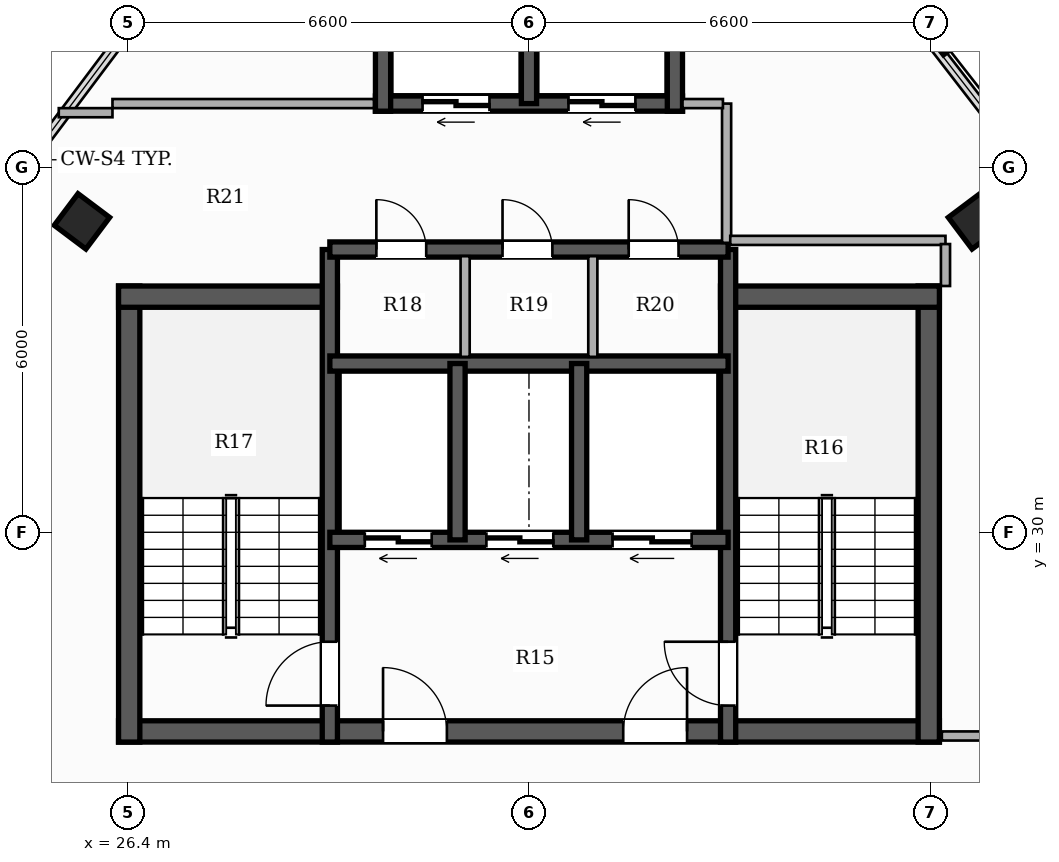
"""IFC4 building model, lengths in metres.
Left out: names, types, materials, properties, quantities, classifications, styles, units other than length and angle.
Written with IfcOpenShell. Run it as: python <this file> out.ifc"""

import sys

from ifc_helpers import new_model, si_unit, direction, frame, frame_2d, origin, origin_2d, place, context, subcontext, project, spatial, rectangle, hollow_rectangle, extrude, element, fill, save


model = new_model("IFC4")
c1 = context("Model", 3, precision=1e-05, world=origin(), true_north=direction((0.0, 1.0)))
c2 = subcontext(c1, "Body", "Model", "MODEL_VIEW")
j1 = project(units=[si_unit("LENGTHUNIT", "METRE"), si_unit("PLANEANGLEUNIT", "RADIAN")], contexts=[c1])
p1 = place(None, origin())
s1 = spatial("IfcSite", under=j1, at=p1, CompositionType="ELEMENT")
p2 = place(p1, origin())
s2 = spatial("IfcBuilding", under=s1, at=p2, CompositionType="ELEMENT")
p3 = place(p2, frame((0.0, 0.0, 266.75)))
s3 = spatial("IfcBuildingStorey", under=s2, at=p3, CompositionType="ELEMENT", Elevation=266.75)
p4 = place(p3, frame((26.25, 26.725, 0.0), z_axis=(0.0, 0.0, 1.0), x_axis=(1.0, 0.0, 0.0)))
e1 = element("IfcWall", 1, at=p4, inside=s3, PredefinedType="SHEAR", context=c2, shape_type="SweptSolid", body=[
    extrude(rectangle(XDim=13.5, YDim=0.35, at=frame_2d((6.75, 0.0))), origin(), (0.0, 0.0, 1.0), 3.3),
])
p5 = place(p4, frame((4.35, 0.0, 0.0)))
e2 = element("IfcOpeningElement", 2, at=p5, cuts=e1, PredefinedType="OPENING", context=c2, shape_type="SweptSolid", body=[
    extrude(rectangle(XDim=1.05, YDim=2.15, at=frame_2d((0.525, 1.075))), frame((0.0, 0.185, 0.0), z_axis=(0.0, -1.0, 0.0), x_axis=(1.0, 0.0, 0.0)), (0.0, 0.0, 1.0), 0.37),
])
p6 = place(p4, frame((8.3, 0.0, 0.0)))
e3 = element("IfcOpeningElement", 3, at=p6, cuts=e1, PredefinedType="OPENING", context=c2, shape_type="SweptSolid", body=[
    extrude(rectangle(XDim=1.05, YDim=2.15, at=frame_2d((0.525, 1.075))), frame((0.0, 0.185, 0.0), z_axis=(0.0, -1.0, 0.0), x_axis=(1.0, 0.0, 0.0)), (0.0, 0.0, 1.0), 0.37),
])
p7 = place(p3, frame((26.425, 26.55, 0.0), z_axis=(0.0, 0.0, 1.0), x_axis=(0.0, 1.0, 0.0)))
e4 = element("IfcWall", 4, at=p7, inside=s3, PredefinedType="SHEAR", context=c2, shape_type="SweptSolid", body=[
    extrude(rectangle(XDim=7.5, YDim=0.35, at=frame_2d((3.75, 0.0))), origin(), (0.0, 0.0, 1.0), 3.3),
])
p8 = place(p3, frame((26.25, 33.875, 0.0), z_axis=(0.0, 0.0, 1.0), x_axis=(1.0, 0.0, 0.0)))
e5 = element("IfcWall", 5, at=p8, inside=s3, PredefinedType="SHEAR", context=c2, shape_type="SweptSolid", body=[
    extrude(rectangle(XDim=3.6, YDim=0.35, at=frame_2d((1.8, 0.0))), origin(), (0.0, 0.0, 1.0), 3.3),
])
p9 = place(p3, frame((39.575, 26.55, 0.0), z_axis=(0.0, 0.0, 1.0), x_axis=(0.0, 1.0, 0.0)))
e6 = element("IfcWall", 6, at=p9, inside=s3, PredefinedType="SHEAR", context=c2, shape_type="SweptSolid", body=[
    extrude(rectangle(XDim=7.5, YDim=0.35, at=frame_2d((3.75, 0.0))), origin(), (0.0, 0.0, 1.0), 3.3),
])
p10 = place(p3, frame((36.15, 33.875, 0.0), z_axis=(0.0, 0.0, 1.0), x_axis=(1.0, 0.0, 0.0)))
e7 = element("IfcWall", 7, at=p10, inside=s3, PredefinedType="SHEAR", context=c2, shape_type="SweptSolid", body=[
    extrude(rectangle(XDim=3.6, YDim=0.35, at=frame_2d((1.8, 0.0))), origin(), (0.0, 0.0, 1.0), 3.3),
])
p11 = place(p3, frame((29.725, 26.55, 0.0), z_axis=(0.0, 0.0, 1.0), x_axis=(0.0, 1.0, 0.0)))
e8 = element("IfcWall", 8, at=p11, inside=s3, PredefinedType="SHEAR", context=c2, shape_type="SweptSolid", body=[
    extrude(rectangle(XDim=8.1, YDim=0.25, at=frame_2d((4.05, 0.0))), origin(), (0.0, 0.0, 1.0), 3.3),
])
p12 = place(p11, frame((0.6, 0.0, 0.0)))
e9 = element("IfcOpeningElement", 9, at=p12, cuts=e8, PredefinedType="OPENING", context=c2, shape_type="SweptSolid", body=[
    extrude(rectangle(XDim=1.05, YDim=2.15, at=frame_2d((0.525, 1.075))), frame((0.0, 0.135, 0.0), z_axis=(0.0, -1.0, 0.0), x_axis=(1.0, 0.0, 0.0)), (0.0, 0.0, 1.0), 0.27),
])
p13 = place(p3, frame((36.275, 26.55, 0.0), z_axis=(0.0, 0.0, 1.0), x_axis=(0.0, 1.0, 0.0)))
e10 = element("IfcWall", 10, at=p13, inside=s3, PredefinedType="SHEAR", context=c2, shape_type="SweptSolid", body=[
    extrude(rectangle(XDim=8.1, YDim=0.25, at=frame_2d((4.05, 0.0))), origin(), (0.0, 0.0, 1.0), 3.3),
])
p14 = place(p13, frame((0.6, 0.0, 0.0)))
e11 = element("IfcOpeningElement", 11, at=p14, cuts=e10, PredefinedType="OPENING", context=c2, shape_type="SweptSolid", body=[
    extrude(rectangle(XDim=1.05, YDim=2.15, at=frame_2d((0.525, 1.075))), frame((0.0, 0.135, 0.0), z_axis=(0.0, -1.0, 0.0), x_axis=(1.0, 0.0, 0.0)), (0.0, 0.0, 1.0), 0.27),
])
p15 = place(p3, frame((36.275, 29.875, 0.0), z_axis=(0.0, 0.0, 1.0), x_axis=(-1.0, 0.0, 0.0)))
e12 = element("IfcWall", 12, at=p15, inside=s3, PredefinedType="SHEAR", context=c2, shape_type="SweptSolid", body=[
    extrude(rectangle(XDim=6.55, YDim=0.25, at=frame_2d((3.275, 0.0))), origin(), (0.0, 0.0, 1.0), 3.3),
])
p16 = place(p15, frame((4.875, 0.0, 0.0)))
e13 = element("IfcOpeningElement", 13, at=p16, cuts=e12, PredefinedType="OPENING", context=c2, shape_type="SweptSolid", body=[
    extrude(rectangle(XDim=1.1, YDim=2.2, at=frame_2d((0.55, 1.1))), frame((0.0, 0.135, 0.0), z_axis=(0.0, -1.0, 0.0), x_axis=(1.0, 0.0, 0.0)), (0.0, 0.0, 1.0), 0.27),
])
p17 = place(p15, frame((2.875, 0.0, 0.0)))
e14 = element("IfcOpeningElement", 14, at=p17, cuts=e12, PredefinedType="OPENING", context=c2, shape_type="SweptSolid", body=[
    extrude(rectangle(XDim=1.1, YDim=2.2, at=frame_2d((0.55, 1.1))), frame((0.0, 0.135, 0.0), z_axis=(0.0, -1.0, 0.0), x_axis=(1.0, 0.0, 0.0)), (0.0, 0.0, 1.0), 0.27),
])
p18 = place(p15, frame((0.6, 0.0, 0.0)))
e15 = element("IfcOpeningElement", 15, at=p18, cuts=e12, PredefinedType="OPENING", context=c2, shape_type="SweptSolid", body=[
    extrude(rectangle(XDim=1.3, YDim=2.2, at=frame_2d((0.65, 1.1))), frame((0.0, 0.135, 0.0), z_axis=(0.0, -1.0, 0.0), x_axis=(1.0, 0.0, 0.0)), (0.0, 0.0, 1.0), 0.27),
])
p19 = place(p3, frame((29.725, 32.775, 0.0), z_axis=(0.0, 0.0, 1.0), x_axis=(1.0, 0.0, 0.0)))
e16 = element("IfcWall", 16, at=p19, inside=s3, PredefinedType="SHEAR", context=c2, shape_type="SweptSolid", body=[
    extrude(rectangle(XDim=6.55, YDim=0.25, at=frame_2d((3.275, 0.0))), origin(), (0.0, 0.0, 1.0), 3.3),
])
for number, where, z_axis, x_axis in (
    (17, (31.825, 29.875, 0.0), (0.0, 0.0, 1.0), (0.0, 1.0, 0.0)),
    (18, (33.825, 29.875, 0.0), (0.0, 0.0, 1.0), (0.0, 1.0, 0.0)),
):
    element("IfcWall", number, at=place(p3, frame(where, z_axis=z_axis, x_axis=x_axis)), inside=s3, PredefinedType="SHEAR", context=c2, shape_type="SweptSolid", body=[
        extrude(rectangle(XDim=2.9, YDim=0.25, at=frame_2d((1.45, 0.0))), origin(), (0.0, 0.0, 1.0), 3.3),
    ])
p20 = place(p3, frame((29.725, 34.65, 0.0), z_axis=(0.0, 0.0, 1.0), x_axis=(1.0, 0.0, 0.0)))
e19 = element("IfcWall", 19, at=p20, inside=s3, PredefinedType="SHEAR", context=c2, shape_type="SweptSolid", body=[
    extrude(rectangle(XDim=6.55, YDim=0.25, at=frame_2d((3.275, 0.0))), origin(), (0.0, 0.0, 1.0), 3.3),
])
p21 = place(p20, frame((0.765, 0.0, 0.0)))
e20 = element("IfcOpeningElement", 20, at=p21, cuts=e19, PredefinedType="OPENING", context=c2, shape_type="SweptSolid", body=[
    extrude(rectangle(XDim=0.82, YDim=2.1, at=frame_2d((0.41, 1.05))), frame((0.0, 0.135, 0.0), z_axis=(0.0, -1.0, 0.0), x_axis=(1.0, 0.0, 0.0)), (0.0, 0.0, 1.0), 0.27),
])
p22 = place(p20, frame((2.84, 0.0, 0.0)))
e21 = element("IfcOpeningElement", 21, at=p22, cuts=e19, PredefinedType="OPENING", context=c2, shape_type="SweptSolid", body=[
    extrude(rectangle(XDim=0.82, YDim=2.1, at=frame_2d((0.41, 1.05))), frame((0.0, 0.135, 0.0), z_axis=(0.0, -1.0, 0.0), x_axis=(1.0, 0.0, 0.0)), (0.0, 0.0, 1.0), 0.27),
])
p23 = place(p20, frame((4.915, 0.0, 0.0)))
e22 = element("IfcOpeningElement", 22, at=p23, cuts=e19, PredefinedType="OPENING", context=c2, shape_type="SweptSolid", body=[
    extrude(rectangle(XDim=0.82, YDim=2.1, at=frame_2d((0.41, 1.05))), frame((0.0, 0.135, 0.0), z_axis=(0.0, -1.0, 0.0), x_axis=(1.0, 0.0, 0.0)), (0.0, 0.0, 1.0), 0.27),
])
p24 = place(p3, frame((35.525, 37.05, 0.0), z_axis=(0.0, 0.0, 1.0), x_axis=(-1.0, 0.0, 0.0)))
e23 = element("IfcWall", 23, at=p24, inside=s3, PredefinedType="SHEAR", context=c2, shape_type="SweptSolid", body=[
    extrude(rectangle(XDim=5.05, YDim=0.25, at=frame_2d((2.525, 0.0))), origin(), (0.0, 0.0, 1.0), 3.3),
])
p25 = place(p24, frame((3.175, 0.0, 0.0)))
e24 = element("IfcOpeningElement", 24, at=p25, cuts=e23, PredefinedType="OPENING", context=c2, shape_type="SweptSolid", body=[
    extrude(rectangle(XDim=1.1, YDim=2.2, at=frame_2d((0.55, 1.1))), frame((0.0, 0.135, 0.0), z_axis=(0.0, -1.0, 0.0), x_axis=(1.0, 0.0, 0.0)), (0.0, 0.0, 1.0), 0.27),
])
p26 = place(p24, frame((0.775, 0.0, 0.0)))
e25 = element("IfcOpeningElement", 25, at=p26, cuts=e23, PredefinedType="OPENING", context=c2, shape_type="SweptSolid", body=[
    extrude(rectangle(XDim=1.1, YDim=2.2, at=frame_2d((0.55, 1.1))), frame((0.0, 0.135, 0.0), z_axis=(0.0, -1.0, 0.0), x_axis=(1.0, 0.0, 0.0)), (0.0, 0.0, 1.0), 0.27),
])
for number, where, z_axis, x_axis in (
    (26, (30.6, 36.925, 0.0), (0.0, 0.0, 1.0), (0.0, 1.0, 0.0)),
    (27, (35.4, 36.925, 0.0), (0.0, 0.0, 1.0), (0.0, 1.0, 0.0)),
):
    element("IfcWall", number, at=place(p3, frame(where, z_axis=z_axis, x_axis=x_axis)), inside=s3, PredefinedType="SHEAR", context=c2, shape_type="SweptSolid", body=[
        extrude(rectangle(XDim=2.8, YDim=0.25, at=frame_2d((1.4, 0.0))), origin(), (0.0, 0.0, 1.0), 3.3),
    ])
p27 = place(p3, frame((33.0, 37.05, 0.0), z_axis=(0.0, 0.0, 1.0), x_axis=(0.0, 1.0, 0.0)))
e28 = element("IfcWall", 28, at=p27, inside=s3, PredefinedType="SHEAR", context=c2, shape_type="SweptSolid", body=[
    extrude(rectangle(XDim=2.55, YDim=0.25, at=frame_2d((1.275, 0.0))), origin(), (0.0, 0.0, 1.0), 3.3),
])
for number, where, z_axis, x_axis in (
    (29, (25.648, 35.113, 0.0), (0.0, 0.0, 1.0), (0.6, 0.8, 0.0)),
    (30, (40.352, 35.113, 0.0), (0.0, 0.0, 1.0), (-0.6, 0.8, 0.0)),
):
    element("IfcColumn", number, at=place(p3, frame(where, z_axis=z_axis, x_axis=x_axis)), inside=s3, PredefinedType="COLUMN", context=c2, shape_type="SweptSolid", body=[
        extrude(hollow_rectangle(XDim=0.65, YDim=0.65, WallThickness=0.022, at=origin_2d()), origin(), (0.0, 0.0, 1.0), 3.3),
    ])
p28 = place(p3, frame((36.25, 34.76, 0.0), z_axis=(0.0, 0.0, 1.0), x_axis=(0.0, 1.0, 0.0)))
e31 = element("IfcWall", 31, at=p28, inside=s3, PredefinedType="PARTITIONING", context=c2, shape_type="SweptSolid", body=[
    extrude(rectangle(XDim=2.29, YDim=0.15, at=frame_2d((1.145, 0.0))), origin(), (0.0, 0.0, 1.0), 2.425),
])
p29 = place(p3, frame((35.525, 37.05, 0.0), z_axis=(0.0, 0.0, 1.0), x_axis=(1.0, 0.0, 0.0)))
e32 = element("IfcWall", 32, at=p29, inside=s3, PredefinedType="PARTITIONING", context=c2, shape_type="SweptSolid", body=[
    extrude(rectangle(XDim=0.665, YDim=0.15, at=frame_2d((0.333, 0.0))), origin(), (0.0, 0.0, 1.0), 2.425),
])
for number, where, z_axis, x_axis in (
    (33, (31.95, 32.885, 0.0), (0.0, 0.0, 1.0), (0.0, 1.0, 0.0)),
    (34, (34.05, 32.885, 0.0), (0.0, 0.0, 1.0), (0.0, 1.0, 0.0)),
):
    element("IfcWall", number, at=place(p3, frame(where, z_axis=z_axis, x_axis=x_axis)), inside=s3, PredefinedType="PARTITIONING", context=c2, shape_type="SweptSolid", body=[
        extrude(rectangle(XDim=1.655, YDim=0.15, at=frame_2d((0.828, 0.0))), origin(), (0.0, 0.0, 1.0), 3.06),
    ])
p30 = place(p3, frame((25.267, 36.9, 0.0), z_axis=(0.0, 0.0, 1.0), x_axis=(1.0, 0.0, 0.0)))
e35 = element("IfcWall", 35, at=p30, inside=s3, PredefinedType="PARTITIONING", context=c2, shape_type="SweptSolid", body=[
    extrude(rectangle(XDim=0.883, YDim=0.15, at=frame_2d((0.441, 0.0))), origin(), (0.0, 0.0, 1.0), 3.06),
])
p31 = place(p3, frame((39.79, 26.65, 0.0), z_axis=(0.0, 0.0, 1.0), x_axis=(1.0, 0.0, 0.0)))
e36 = element("IfcWall", 36, at=p31, inside=s3, PredefinedType="PARTITIONING", context=c2, shape_type="SweptSolid", body=[
    extrude(rectangle(XDim=2.46, YDim=0.15, at=frame_2d((1.23, 0.0))), origin(), (0.0, 0.0, 1.0), 2.565),
])
p32 = place(p3, frame((26.15, 37.05, 0.0), z_axis=(0.0, 0.0, 1.0), x_axis=(1.0, 0.0, 0.0)))
e37 = element("IfcWall", 37, at=p32, inside=s3, PredefinedType="PARTITIONING", context=c2, shape_type="SweptSolid", body=[
    extrude(rectangle(XDim=4.3, YDim=0.15, at=frame_2d((2.15, 0.0))), origin(), (0.0, 0.0, 1.0), 2.425),
])
p33 = place(p3, frame((36.31, 34.8, 0.0), z_axis=(0.0, 0.0, 1.0), x_axis=(1.0, 0.0, 0.0)))
e38 = element("IfcWall", 38, at=p33, inside=s3, PredefinedType="PARTITIONING", context=c2, shape_type="SweptSolid", body=[
    extrude(rectangle(XDim=3.54, YDim=0.15, at=frame_2d((1.77, 0.0))), origin(), (0.0, 0.0, 1.0), 2.425),
])
p34 = place(p3, frame((39.85, 34.74, 0.0), z_axis=(0.0, 0.0, 1.0), x_axis=(0.0, -1.0, 0.0)))
e39 = element("IfcWall", 39, at=p34, inside=s3, PredefinedType="PARTITIONING", context=c2, shape_type="SweptSolid", body=[
    extrude(rectangle(XDim=0.69, YDim=0.15, at=frame_2d((0.345, 0.0))), origin(), (0.0, 0.0, 1.0), 2.773),
])
p35 = place(p12, origin())
e40 = element("IfcDoor", 40, at=p35, inside=s3, OperationType="SINGLE_SWING_LEFT", PredefinedType="DOOR", context=c2, shape_type="SweptSolid", body=[
    extrude(rectangle(XDim=1.05, YDim=2.15, at=frame_2d((0.525, 1.075))), frame((0.0, 0.025, 0.0), z_axis=(0.0, -1.0, 0.0), x_axis=(1.0, 0.0, 0.0)), (0.0, 0.0, 1.0), 0.05),
])
fill(e9, e40)
p36 = place(p14, origin())
e41 = element("IfcDoor", 41, at=p36, inside=s3, OperationType="SINGLE_SWING_RIGHT", PredefinedType="DOOR", context=c2, shape_type="SweptSolid", body=[
    extrude(rectangle(XDim=1.05, YDim=2.15, at=frame_2d((0.525, 1.075))), frame((0.0, 0.025, 0.0), z_axis=(0.0, -1.0, 0.0), x_axis=(1.0, 0.0, 0.0)), (0.0, 0.0, 1.0), 0.05),
])
fill(e11, e41)
p37 = place(p5, origin())
e42 = element("IfcDoor", 42, at=p37, inside=s3, OperationType="SINGLE_SWING_LEFT", PredefinedType="DOOR", context=c2, shape_type="SweptSolid", body=[
    extrude(rectangle(XDim=1.05, YDim=2.15, at=frame_2d((0.525, 1.075))), frame((0.0, 0.025, 0.0), z_axis=(0.0, -1.0, 0.0), x_axis=(1.0, 0.0, 0.0)), (0.0, 0.0, 1.0), 0.05),
])
fill(e2, e42)
p38 = place(p6, origin())
e43 = element("IfcDoor", 43, at=p38, inside=s3, OperationType="SINGLE_SWING_RIGHT", PredefinedType="DOOR", context=c2, shape_type="SweptSolid", body=[
    extrude(rectangle(XDim=1.05, YDim=2.15, at=frame_2d((0.525, 1.075))), frame((0.0, 0.025, 0.0), z_axis=(0.0, -1.0, 0.0), x_axis=(1.0, 0.0, 0.0)), (0.0, 0.0, 1.0), 0.05),
])
fill(e3, e43)
p39 = place(p16, origin())
e44 = element("IfcDoor", 44, at=p39, inside=s3, OperationType="DOUBLE_DOOR_SLIDING", PredefinedType="DOOR", context=c2, shape_type="SweptSolid", body=[
    extrude(rectangle(XDim=1.1, YDim=2.2, at=frame_2d((0.55, 1.1))), frame((0.0, 0.025, 0.0), z_axis=(0.0, -1.0, 0.0), x_axis=(1.0, 0.0, 0.0)), (0.0, 0.0, 1.0), 0.05),
])
fill(e13, e44)
p40 = place(p17, origin())
e45 = element("IfcDoor", 45, at=p40, inside=s3, OperationType="DOUBLE_DOOR_SLIDING", PredefinedType="DOOR", context=c2, shape_type="SweptSolid", body=[
    extrude(rectangle(XDim=1.1, YDim=2.2, at=frame_2d((0.55, 1.1))), frame((0.0, 0.025, 0.0), z_axis=(0.0, -1.0, 0.0), x_axis=(1.0, 0.0, 0.0)), (0.0, 0.0, 1.0), 0.05),
])
fill(e14, e45)
p41 = place(p18, origin())
e46 = element("IfcDoor", 46, at=p41, inside=s3, OperationType="DOUBLE_DOOR_SLIDING", PredefinedType="DOOR", context=c2, shape_type="SweptSolid", body=[
    extrude(rectangle(XDim=1.3, YDim=2.2, at=frame_2d((0.65, 1.1))), frame((0.0, 0.025, 0.0), z_axis=(0.0, -1.0, 0.0), x_axis=(1.0, 0.0, 0.0)), (0.0, 0.0, 1.0), 0.05),
])
fill(e15, e46)
p42 = place(p25, origin())
e47 = element("IfcDoor", 47, at=p42, inside=s3, OperationType="DOUBLE_DOOR_SLIDING", PredefinedType="DOOR", context=c2, shape_type="SweptSolid", body=[
    extrude(rectangle(XDim=1.1, YDim=2.2, at=frame_2d((0.55, 1.1))), frame((0.0, 0.025, 0.0), z_axis=(0.0, -1.0, 0.0), x_axis=(1.0, 0.0, 0.0)), (0.0, 0.0, 1.0), 0.05),
])
fill(e24, e47)
p43 = place(p26, origin())
e48 = element("IfcDoor", 48, at=p43, inside=s3, OperationType="DOUBLE_DOOR_SLIDING", PredefinedType="DOOR", context=c2, shape_type="SweptSolid", body=[
    extrude(rectangle(XDim=1.1, YDim=2.2, at=frame_2d((0.55, 1.1))), frame((0.0, 0.025, 0.0), z_axis=(0.0, -1.0, 0.0), x_axis=(1.0, 0.0, 0.0)), (0.0, 0.0, 1.0), 0.05),
])
fill(e25, e48)
p44 = place(p21, origin())
e49 = element("IfcDoor", 49, at=p44, inside=s3, OperationType="SINGLE_SWING_LEFT", PredefinedType="DOOR", context=c2, shape_type="SweptSolid", body=[
    extrude(rectangle(XDim=0.82, YDim=2.1, at=frame_2d((0.41, 1.05))), frame((0.0, 0.025, 0.0), z_axis=(0.0, -1.0, 0.0), x_axis=(1.0, 0.0, 0.0)), (0.0, 0.0, 1.0), 0.05),
])
fill(e20, e49)
p45 = place(p22, origin())
e50 = element("IfcDoor", 50, at=p45, inside=s3, OperationType="SINGLE_SWING_LEFT", PredefinedType="DOOR", context=c2, shape_type="SweptSolid", body=[
    extrude(rectangle(XDim=0.82, YDim=2.1, at=frame_2d((0.41, 1.05))), frame((0.0, 0.025, 0.0), z_axis=(0.0, -1.0, 0.0), x_axis=(1.0, 0.0, 0.0)), (0.0, 0.0, 1.0), 0.05),
])
fill(e21, e50)
p46 = place(p23, origin())
e51 = element("IfcDoor", 51, at=p46, inside=s3, OperationType="SINGLE_SWING_LEFT", PredefinedType="DOOR", context=c2, shape_type="SweptSolid", body=[
    extrude(rectangle(XDim=0.82, YDim=2.1, at=frame_2d((0.41, 1.05))), frame((0.0, 0.025, 0.0), z_axis=(0.0, -1.0, 0.0), x_axis=(1.0, 0.0, 0.0)), (0.0, 0.0, 1.0), 0.05),
])
fill(e22, e51)
save(model, sys.argv[1])
